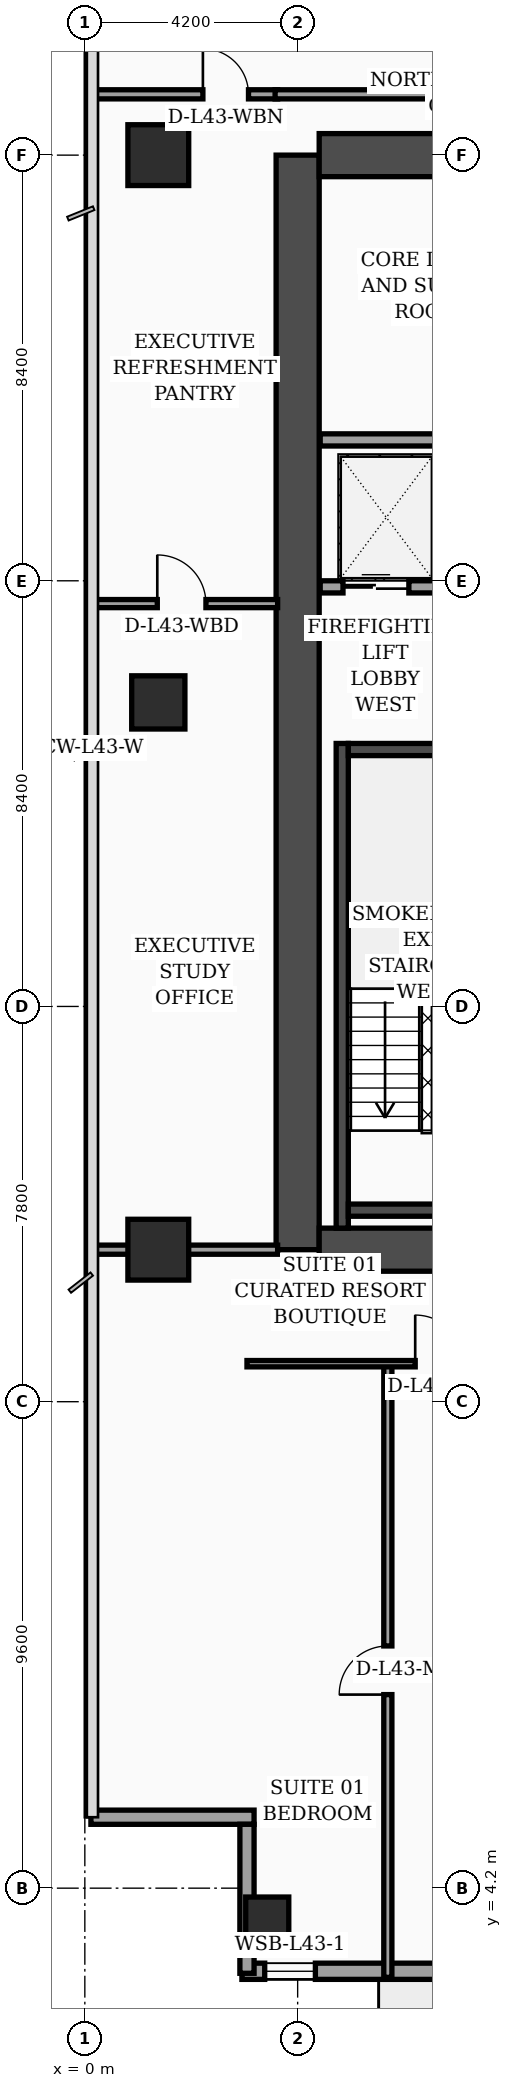
"""IFC4 building model, lengths in metres.
Left out: names, types, materials, properties, quantities, classifications, styles, units other than length and angle.
Written with IfcOpenShell. Run it as: python <this file> out.ifc"""

import sys

from ifc_helpers import new_model, si_unit, direction, frame, frame_2d, origin, origin_2d, place, context, subcontext, project, spatial, rectangle, hollow_rectangle, extrude, element, fill, save


model = new_model("IFC4")
c1 = context("Model", 3, precision=1e-05, world=origin(), true_north=direction((0.0, 1.0)))
c2 = subcontext(c1, "Body", "Model", "MODEL_VIEW")
j1 = project(units=[si_unit("LENGTHUNIT", "METRE"), si_unit("PLANEANGLEUNIT", "RADIAN")], contexts=[c1])
p1 = place(None, origin())
s1 = spatial("IfcSite", under=j1, at=p1, CompositionType="ELEMENT")
p2 = place(p1, origin())
s2 = spatial("IfcBuilding", under=s1, at=p2, CompositionType="ELEMENT")
p3 = place(p2, frame((0.0, 0.0, 175.1)))
s3 = spatial("IfcBuildingStorey", under=s2, at=p3, CompositionType="ELEMENT", Elevation=175.1)
p4 = place(p3, frame((4.2, 16.8, 0.0), z_axis=(0.0, 0.0, 1.0), x_axis=(0.0, 1.0, 0.0)))
e1 = element("IfcWall", 1, at=p4, inside=s3, PredefinedType="SHEAR", context=c2, shape_type="SweptSolid", body=[
    extrude(rectangle(XDim=21.6, YDim=0.85, at=frame_2d((10.8, 0.0))), origin(), (0.0, 0.0, 1.0), 3.56),
])
for number, where, z_axis, x_axis in (
    (2, (4.625, 38.4, 0.0), (0.0, 0.0, 1.0), (1.0, 0.0, 0.0)),
    (3, (4.625, 16.8, 0.0), (0.0, 0.0, 1.0), (1.0, 0.0, 0.0)),
):
    element("IfcWall", number, at=place(p3, frame(where, z_axis=z_axis, x_axis=x_axis)), inside=s3, PredefinedType="SHEAR", context=c2, shape_type="SweptSolid", body=[
        extrude(rectangle(XDim=9.95, YDim=0.85, at=frame_2d((4.975, 0.0))), origin(), (0.0, 0.0, 1.0), 3.56),
    ])
p5 = place(p3, frame((5.08, 17.225, 0.0), z_axis=(0.0, 0.0, 1.0), x_axis=(0.0, 1.0, 0.0)))
e4 = element("IfcWall", 4, at=p5, inside=s3, PredefinedType="SOLIDWALL", context=c2, shape_type="SweptSolid", body=[
    extrude(rectangle(XDim=9.565, YDim=0.24, at=frame_2d((4.782, 0.0))), origin(), (0.0, 0.0, 1.0), 3.56),
])
for number, where, z_axis, x_axis in (
    (5, (5.2, 17.58, 0.0), (0.0, 0.0, 1.0), (1.0, 0.0, 0.0)),
    (6, (5.2, 26.67, 0.0), (0.0, 0.0, 1.0), (1.0, 0.0, 0.0)),
):
    element("IfcWall", number, at=place(p3, frame(where, z_axis=z_axis, x_axis=x_axis)), inside=s3, PredefinedType="SOLIDWALL", context=c2, shape_type="SweptSolid", body=[
        extrude(rectangle(XDim=3.1, YDim=0.24, at=frame_2d((1.55, 0.0))), origin(), (0.0, 0.0, 1.0), 3.56),
    ])
p6 = place(p3, frame((3.6, 3.6, 0.0), z_axis=(0.0, 0.0, 1.0), x_axis=(1.0, 0.0, 0.0)))
e7 = element("IfcColumn", 7, at=p6, inside=s3, PredefinedType="COLUMN", context=c2, shape_type="SweptSolid", body=[
    extrude(hollow_rectangle(XDim=0.85, YDim=0.85, WallThickness=0.036, at=origin_2d()), origin(), (0.0, 0.0, 1.0), 3.56),
])
p7 = place(p3, frame((1.45, 16.8, 0.0), z_axis=(0.0, 0.0, 1.0), x_axis=(1.0, 0.0, 0.0)))
e8 = element("IfcColumn", 8, at=p7, inside=s3, PredefinedType="COLUMN", context=c2, shape_type="SweptSolid", body=[
    extrude(rectangle(XDim=1.2, YDim=1.2, at=origin_2d()), origin(), (0.0, 0.0, 1.0), 3.56),
])
p8 = place(p3, frame((1.45, 27.6, 0.0), z_axis=(0.0, 0.0, 1.0), x_axis=(1.0, 0.0, 0.0)))
e9 = element("IfcColumn", 9, at=p8, inside=s3, PredefinedType="COLUMN", context=c2, shape_type="SweptSolid", body=[
    extrude(rectangle(XDim=1.05, YDim=1.05, at=origin_2d()), origin(), (0.0, 0.0, 1.0), 3.56),
])
p9 = place(p3, frame((1.45, 38.4, 0.0), z_axis=(0.0, 0.0, 1.0), x_axis=(1.0, 0.0, 0.0)))
e10 = element("IfcColumn", 10, at=p9, inside=s3, PredefinedType="COLUMN", context=c2, shape_type="SweptSolid", body=[
    extrude(rectangle(XDim=1.2, YDim=1.2, at=origin_2d()), origin(), (0.0, 0.0, 1.0), 3.56),
])
p10 = place(p3, frame((3.1, 2.56, 0.0), z_axis=(0.0, 0.0, 1.0), x_axis=(1.0, 0.0, 0.0)))
e11 = element("IfcWall", 11, at=p10, inside=s3, PredefinedType="SOLIDWALL", context=c2, shape_type="SweptSolid", body=[
    extrude(rectangle(XDim=8.0, YDim=0.32, at=frame_2d((4.0, 0.0))), origin(), (0.0, 0.0, 1.0), 3.56),
])
p11 = place(p10, frame((0.45, 0.0, 0.75)))
e12 = element("IfcOpeningElement", 12, at=p11, cuts=e11, PredefinedType="OPENING", context=c2, shape_type="SweptSolid", body=[
    extrude(rectangle(XDim=1.0, YDim=1.6, at=frame_2d((0.5, 0.8))), frame((0.0, 0.17, 0.0), z_axis=(0.0, -1.0, 0.0), x_axis=(1.0, 0.0, 0.0)), (0.0, 0.0, 1.0), 0.34),
])
p12 = place(p10, frame((4.2, 0.0, 0.0)))
e13 = element("IfcOpeningElement", 13, at=p12, cuts=e11, PredefinedType="OPENING", context=c2, shape_type="SweptSolid", body=[
    extrude(rectangle(XDim=1.4, YDim=2.25, at=frame_2d((0.7, 1.125))), frame((0.0, 0.17, 0.0), z_axis=(0.0, -1.0, 0.0), x_axis=(1.0, 0.0, 0.0)), (0.0, 0.0, 1.0), 0.34),
])
p13 = place(p3, frame((0.12, 5.6, 0.0), z_axis=(0.0, 0.0, 1.0), x_axis=(1.0, 0.0, 0.0)))
e14 = element("IfcWall", 14, at=p13, inside=s3, PredefinedType="SOLIDWALL", context=c2, shape_type="SweptSolid", body=[
    extrude(rectangle(XDim=3.22, YDim=0.28, at=frame_2d((1.61, 0.0))), origin(), (0.0, 0.0, 1.0), 2.94),
])
p14 = place(p3, frame((3.2, 5.46, 0.0), z_axis=(0.0, 0.0, 1.0), x_axis=(0.0, -1.0, 0.0)))
e15 = element("IfcWall", 15, at=p14, inside=s3, PredefinedType="SOLIDWALL", context=c2, shape_type="SweptSolid", body=[
    extrude(rectangle(XDim=2.94, YDim=0.28, at=frame_2d((1.47, 0.0))), origin(), (0.0, 0.0, 1.0), 2.94),
])
p15 = place(p3, frame((4.645, 29.88, 0.0), z_axis=(0.0, 0.0, 1.0), x_axis=(1.0, 0.0, 0.0)))
e16 = element("IfcWall", 16, at=p15, inside=s3, PredefinedType="SOLIDWALL", context=c2, shape_type="SweptSolid", body=[
    extrude(rectangle(XDim=4.775, YDim=0.24, at=frame_2d((2.387, 0.0))), origin(), (0.0, 0.0, 1.0), 3.56),
])
p16 = place(p15, frame((0.45, 0.0, 0.0)))
e17 = element("IfcOpeningElement", 17, at=p16, cuts=e16, PredefinedType="OPENING", context=c2, shape_type="SweptSolid", body=[
    extrude(rectangle(XDim=1.3, YDim=2.35, at=frame_2d((0.65, 1.175))), frame((0.0, 0.13, 0.0), z_axis=(0.0, -1.0, 0.0), x_axis=(1.0, 0.0, 0.0)), (0.0, 0.0, 1.0), 0.26),
])
p17 = place(p3, frame((4.645, 32.78, 0.0), z_axis=(0.0, 0.0, 1.0), x_axis=(1.0, 0.0, 0.0)))
e18 = element("IfcWall", 18, at=p17, inside=s3, PredefinedType="SOLIDWALL", context=c2, shape_type="SweptSolid", body=[
    extrude(rectangle(XDim=4.775, YDim=0.24, at=frame_2d((2.387, 0.0))), origin(), (0.0, 0.0, 1.0), 3.19),
])
p18 = place(p3, frame((0.08, 29.55, 0.0), z_axis=(0.0, 0.0, 1.0), x_axis=(1.0, 0.0, 0.0)))
e19 = element("IfcWall", 19, at=p18, inside=s3, PredefinedType="PARTITIONING", context=c2, shape_type="SweptSolid", body=[
    extrude(rectangle(XDim=3.725, YDim=0.16, at=frame_2d((1.862, 0.0))), origin(), (0.0, 0.0, 1.0), 3.04),
])
p19 = place(p18, frame((1.35, 0.0, 0.0)))
e20 = element("IfcOpeningElement", 20, at=p19, cuts=e19, PredefinedType="OPENING", context=c2, shape_type="SweptSolid", body=[
    extrude(rectangle(XDim=0.96, YDim=2.2, at=frame_2d((0.48, 1.1))), frame((0.0, 0.09, 0.0), z_axis=(0.0, -1.0, 0.0), x_axis=(1.0, 0.0, 0.0)), (0.0, 0.0, 1.0), 0.18),
])
p20 = place(p3, frame((0.08, 16.8, 0.0), z_axis=(0.0, 0.0, 1.0), x_axis=(1.0, 0.0, 0.0)))
e21 = element("IfcWall", 21, at=p20, inside=s3, PredefinedType="PARTITIONING", context=c2, shape_type="SweptSolid", body=[
    extrude(rectangle(XDim=3.725, YDim=0.18, at=frame_2d((1.862, 0.0))), origin(), (0.0, 0.0, 1.0), 2.94),
])
p21 = place(p3, frame((0.08, 39.6, 0.0), z_axis=(0.0, 0.0, 1.0), x_axis=(1.0, 0.0, 0.0)))
e22 = element("IfcWall", 22, at=p21, inside=s3, PredefinedType="PARTITIONING", context=c2, shape_type="SweptSolid", body=[
    extrude(rectangle(XDim=3.725, YDim=0.18, at=frame_2d((1.862, 0.0))), origin(), (0.0, 0.0, 1.0), 2.94),
])
p22 = place(p21, frame((2.25, 0.0, 0.0)))
e23 = element("IfcOpeningElement", 23, at=p22, cuts=e22, PredefinedType="OPENING", context=c2, shape_type="SweptSolid", body=[
    extrude(rectangle(XDim=0.9, YDim=2.15, at=frame_2d((0.45, 1.075))), frame((0.0, 0.1, 0.0), z_axis=(0.0, -1.0, 0.0), x_axis=(1.0, 0.0, 0.0)), (0.0, 0.0, 1.0), 0.2),
])
p23 = place(p3, frame((5.98, 2.44, 0.0), z_axis=(0.0, 0.0, 1.0), x_axis=(0.0, 1.0, 0.0)))
e24 = element("IfcWall", 24, at=p23, inside=s3, PredefinedType="PARTITIONING", context=c2, shape_type="SweptSolid", body=[
    extrude(rectangle(XDim=12.11, YDim=0.16, at=frame_2d((6.055, 0.0))), origin(), (0.0, 0.0, 1.0), 3.04),
])
p24 = place(p23, frame((5.58, 0.0, 0.0)))
e25 = element("IfcOpeningElement", 25, at=p24, cuts=e24, PredefinedType="OPENING", context=c2, shape_type="SweptSolid", body=[
    extrude(rectangle(XDim=0.96, YDim=2.2, at=frame_2d((0.48, 1.1))), frame((0.0, 0.09, 0.0), z_axis=(0.0, -1.0, 0.0), x_axis=(1.0, 0.0, 0.0)), (0.0, 0.0, 1.0), 0.18),
])
p25 = place(p3, frame((3.2, 14.55, 0.0), z_axis=(0.0, 0.0, 1.0), x_axis=(1.0, 0.0, 0.0)))
e26 = element("IfcWall", 26, at=p25, inside=s3, PredefinedType="PARTITIONING", context=c2, shape_type="SweptSolid", body=[
    extrude(rectangle(XDim=9.8, YDim=0.125, at=frame_2d((4.9, 0.0))), origin(), (0.0, 0.0, 1.0), 2.94),
])
p26 = place(p25, frame((3.32, 0.0, 0.0)))
e27 = element("IfcOpeningElement", 27, at=p26, cuts=e26, PredefinedType="OPENING", context=c2, shape_type="SweptSolid", body=[
    extrude(rectangle(XDim=0.96, YDim=2.2, at=frame_2d((0.48, 1.1))), frame((0.0, 0.073, 0.0), z_axis=(0.0, -1.0, 0.0), x_axis=(1.0, 0.0, 0.0)), (0.0, 0.0, 1.0), 0.145),
])
p27 = place(p25, frame((7.89, 0.0, 0.0)))
e28 = element("IfcOpeningElement", 28, at=p27, cuts=e26, PredefinedType="OPENING", context=c2, shape_type="SweptSolid", body=[
    extrude(rectangle(XDim=0.9, YDim=2.15, at=frame_2d((0.45, 1.075))), frame((0.0, 0.073, 0.0), z_axis=(0.0, -1.0, 0.0), x_axis=(1.0, 0.0, 0.0)), (0.0, 0.0, 1.0), 0.145),
])
p28 = place(p3, frame((3.755, 39.6, 0.0), z_axis=(0.0, 0.0, 1.0), x_axis=(1.0, 0.0, 0.0)))
e29 = element("IfcWall", 29, at=p28, inside=s3, PredefinedType="PARTITIONING", context=c2, shape_type="SweptSolid", body=[
    extrude(rectangle(XDim=11.395, YDim=0.18, at=frame_2d((5.698, 0.0))), origin(), (0.0, 0.0, 1.0), 2.94),
])
p29 = place(p11, origin())
e30 = element("IfcWindow", 30, at=p29, inside=s3, PartitioningType="SINGLE_PANEL", PredefinedType="WINDOW", context=c2, shape_type="SweptSolid", body=[
    extrude(rectangle(XDim=1.0, YDim=1.6, at=frame_2d((0.5, 0.8))), frame((0.0, 0.03, 0.0), z_axis=(0.0, -1.0, 0.0), x_axis=(1.0, 0.0, 0.0)), (0.0, 0.0, 1.0), 0.06),
])
fill(e12, e30)
p30 = place(p16, origin())
e31 = element("IfcDoor", 31, at=p30, inside=s3, OperationType="DOUBLE_DOOR_SLIDING", PredefinedType="DOOR", context=c2, shape_type="SweptSolid", body=[
    extrude(rectangle(XDim=1.3, YDim=2.35, at=frame_2d((0.65, 1.175))), frame((0.0, 0.025, 0.0), z_axis=(0.0, -1.0, 0.0), x_axis=(1.0, 0.0, 0.0)), (0.0, 0.0, 1.0), 0.05),
])
fill(e17, e31)
p31 = place(p19, origin())
e32 = element("IfcDoor", 32, at=p31, inside=s3, OperationType="SINGLE_SWING_LEFT", PredefinedType="DOOR", context=c2, shape_type="SweptSolid", body=[
    extrude(rectangle(XDim=0.96, YDim=2.2, at=frame_2d((0.48, 1.1))), frame((0.0, 0.025, 0.0), z_axis=(0.0, -1.0, 0.0), x_axis=(1.0, 0.0, 0.0)), (0.0, 0.0, 1.0), 0.05),
])
fill(e20, e32)
p32 = place(p22, origin())
e33 = element("IfcDoor", 33, at=p32, inside=s3, OperationType="SINGLE_SWING_LEFT", PredefinedType="DOOR", context=c2, shape_type="SweptSolid", body=[
    extrude(rectangle(XDim=0.9, YDim=2.15, at=frame_2d((0.45, 1.075))), frame((0.0, 0.025, 0.0), z_axis=(0.0, -1.0, 0.0), x_axis=(1.0, 0.0, 0.0)), (0.0, 0.0, 1.0), 0.05),
])
fill(e23, e33)
p33 = place(p24, origin())
e34 = element("IfcDoor", 34, at=p33, inside=s3, OperationType="SINGLE_SWING_LEFT", PredefinedType="DOOR", context=c2, shape_type="SweptSolid", body=[
    extrude(rectangle(XDim=0.96, YDim=2.2, at=frame_2d((0.48, 1.1))), frame((0.0, 0.025, 0.0), z_axis=(0.0, -1.0, 0.0), x_axis=(1.0, 0.0, 0.0)), (0.0, 0.0, 1.0), 0.05),
])
fill(e25, e34)
p34 = place(p26, origin())
e35 = element("IfcDoor", 35, at=p34, inside=s3, OperationType="SINGLE_SWING_LEFT", PredefinedType="DOOR", context=c2, shape_type="SweptSolid", body=[
    extrude(rectangle(XDim=0.96, YDim=2.2, at=frame_2d((0.48, 1.1))), frame((0.0, 0.025, 0.0), z_axis=(0.0, -1.0, 0.0), x_axis=(1.0, 0.0, 0.0)), (0.0, 0.0, 1.0), 0.05),
])
fill(e27, e35)
save(model, sys.argv[1])
